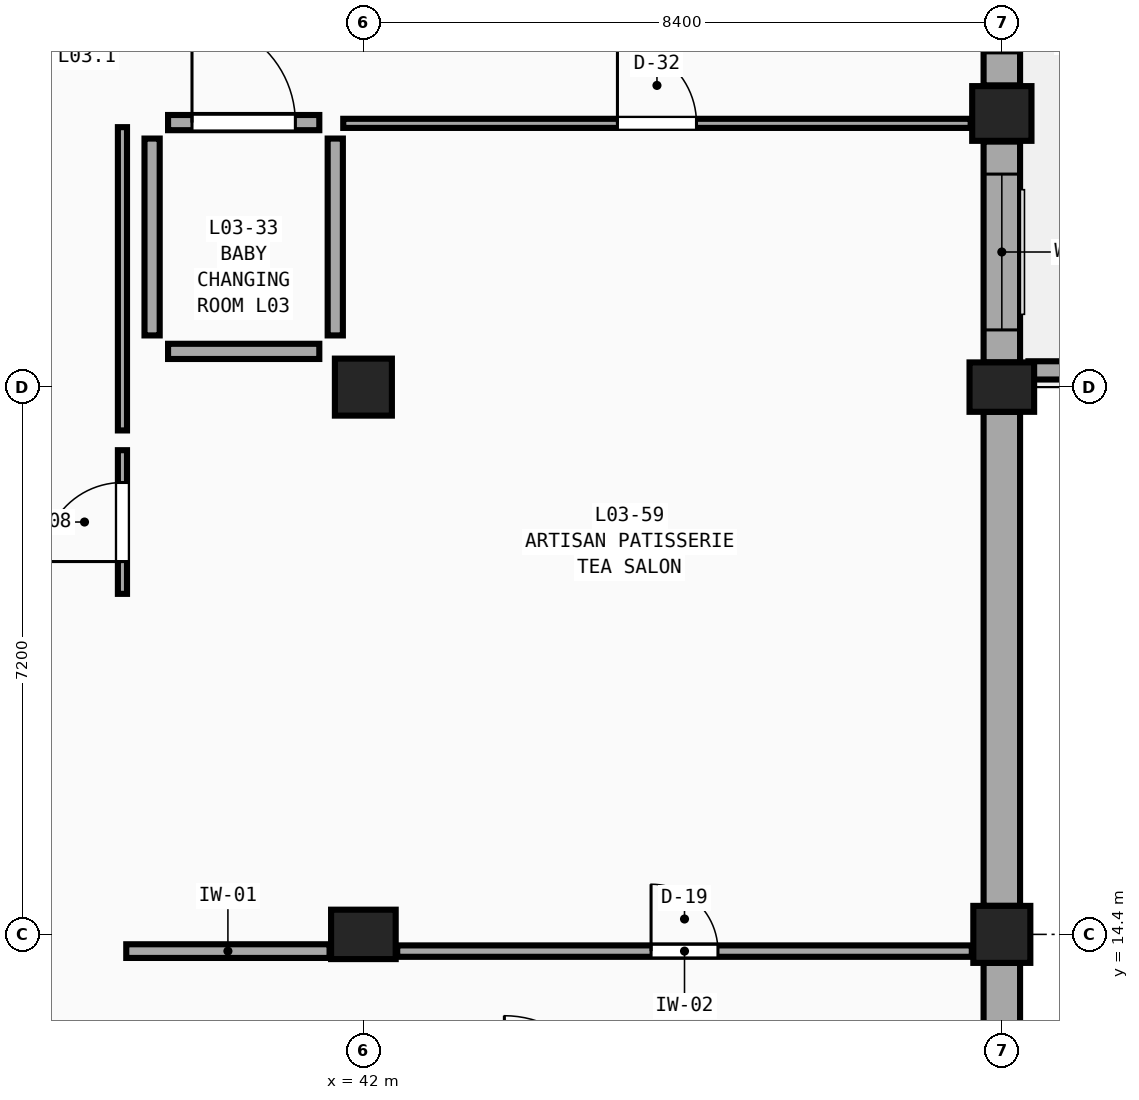
"""IFC4 building model, lengths in metres.
Left out: names, types, materials, properties, quantities, classifications, styles, units other than length and angle.
Written with IfcOpenShell. Run it as: python <this file> out.ifc"""

import sys

from ifc_helpers import new_model, si_unit, direction, frame, frame_2d, origin, origin_2d, place, context, subcontext, project, spatial, rectangle, extrude, element, fill, save


model = new_model("IFC4")
c1 = context("Model", 3, precision=1e-05, world=origin(), true_north=direction((0.0, 1.0)))
c2 = subcontext(c1, "Body", "Model", "MODEL_VIEW")
j1 = project(units=[si_unit("LENGTHUNIT", "METRE"), si_unit("PLANEANGLEUNIT", "RADIAN")], contexts=[c1])
p1 = place(None, origin())
s1 = spatial("IfcSite", under=j1, at=p1, CompositionType="ELEMENT")
p2 = place(p1, origin())
s2 = spatial("IfcBuilding", under=s1, at=p2, CompositionType="ELEMENT")
p3 = place(p2, frame((0.0, 0.0, 14.4)))
s3 = spatial("IfcBuildingStorey", under=s2, at=p3, CompositionType="ELEMENT", Elevation=14.4)
p4 = place(p3, frame((42.0, 14.4, 0.0), z_axis=(0.0, 0.0, 1.0), x_axis=(1.0, 0.0, 0.0)))
e1 = element("IfcColumn", 1, at=p4, inside=s3, PredefinedType="COLUMN", context=c2, shape_type="SweptSolid", body=[
    extrude(rectangle(XDim=0.85, YDim=0.65, at=origin_2d()), origin(), (0.0, 0.0, 1.0), 4.5),
])
for number, where, z_axis, x_axis in (
    (2, (42.0, 21.6, 0.0), (0.0, 0.0, 1.0), (1.0, 0.0, 0.0)),
    (3, (50.4, 14.4, 0.0), (0.0, 0.0, 1.0), (1.0, 0.0, 0.0)),
):
    element("IfcColumn", number, at=place(p3, frame(where, z_axis=z_axis, x_axis=x_axis)), inside=s3, PredefinedType="COLUMN", context=c2, shape_type="SweptSolid", body=[
        extrude(rectangle(XDim=0.75, YDim=0.75, at=origin_2d()), origin(), (0.0, 0.0, 1.0), 4.5),
    ])
p5 = place(p3, frame((50.4, 21.6, 0.0), z_axis=(0.0, 0.0, 1.0), x_axis=(1.0, 0.0, 0.0)))
e4 = element("IfcColumn", 4, at=p5, inside=s3, PredefinedType="COLUMN", context=c2, shape_type="SweptSolid", body=[
    extrude(rectangle(XDim=0.85, YDim=0.65, at=origin_2d()), origin(), (0.0, 0.0, 1.0), 4.5),
])
p6 = place(p3, frame((50.4, 25.2, 0.0), z_axis=(0.0, 0.0, 1.0), x_axis=(1.0, 0.0, 0.0)))
e5 = element("IfcColumn", 5, at=p6, inside=s3, PredefinedType="PILASTER", context=c2, shape_type="SweptSolid", body=[
    extrude(rectangle(XDim=0.78, YDim=0.72, at=origin_2d()), origin(), (0.0, 0.0, 1.0), 4.5),
])
p7 = place(p3, frame((50.4, 14.025, 0.0), z_axis=(0.0, 0.0, 1.0), x_axis=(0.0, -1.0, 0.0)))
e6 = element("IfcWall", 6, at=p7, inside=s3, PredefinedType="SOLIDWALL", context=c2, shape_type="SweptSolid", body=[
    extrude(rectangle(XDim=2.855, YDim=0.48, at=frame_2d((1.427, 0.0))), origin(), (0.0, 0.0, 1.0), 3.63),
])
p8 = place(p3, frame((50.4, 21.275, 0.0), z_axis=(0.0, 0.0, 1.0), x_axis=(0.0, -1.0, 0.0)))
e7 = element("IfcWall", 7, at=p8, inside=s3, PredefinedType="SOLIDWALL", context=c2, shape_type="SweptSolid", body=[
    extrude(rectangle(XDim=6.5, YDim=0.48, at=frame_2d((3.25, 0.0))), origin(), (0.0, 0.0, 1.0), 3.63),
])
p9 = place(p3, frame((50.4, 28.425, 0.0), z_axis=(0.0, 0.0, 1.0), x_axis=(0.0, -1.0, 0.0)))
e8 = element("IfcWall", 8, at=p9, inside=s3, PredefinedType="SOLIDWALL", context=c2, shape_type="SweptSolid", body=[
    extrude(rectangle(XDim=2.855, YDim=0.48, at=frame_2d((1.427, 0.0))), origin(), (0.0, 0.0, 1.0), 3.63),
])
p10 = place(p9, frame((0.427, 0.0, 0.75)))
e9 = element("IfcOpeningElement", 9, at=p10, cuts=e8, PredefinedType="OPENING", context=c2, shape_type="SweptSolid", body=[
    extrude(rectangle(XDim=2.0, YDim=2.62, at=frame_2d((1.0, 1.31))), frame((0.0, 0.26, 0.0), z_axis=(0.0, -1.0, 0.0), x_axis=(1.0, 0.0, 0.0)), (0.0, 0.0, 1.0), 0.52),
])
p11 = place(p3, frame((50.4, 24.83, 0.0), z_axis=(0.0, 0.0, 1.0), x_axis=(0.0, -1.0, 0.0)))
e10 = element("IfcWall", 10, at=p11, inside=s3, PredefinedType="SOLIDWALL", context=c2, shape_type="SweptSolid", body=[
    extrude(rectangle(XDim=2.905, YDim=0.48, at=frame_2d((1.453, 0.0))), origin(), (0.0, 0.0, 1.0), 3.63),
])
p12 = place(p11, frame((0.427, 0.0, 0.75)))
e11 = element("IfcOpeningElement", 11, at=p12, cuts=e10, PredefinedType="OPENING", context=c2, shape_type="SweptSolid", body=[
    extrude(rectangle(XDim=2.05, YDim=2.62, at=frame_2d((1.025, 1.31))), frame((0.0, 0.26, 0.0), z_axis=(0.0, -1.0, 0.0), x_axis=(1.0, 0.0, 0.0)), (0.0, 0.0, 1.0), 0.52),
])
p13 = place(p3, frame((57.95, 21.82, 0.0), z_axis=(0.0, 0.0, 1.0), x_axis=(-1.0, 0.0, 0.0)))
e12 = element("IfcWall", 12, at=p13, inside=s3, PredefinedType="PARAPET", context=c2, shape_type="SweptSolid", body=[
    extrude(rectangle(XDim=7.2, YDim=0.24, at=frame_2d((3.6, 0.0))), origin(), (0.0, 0.0, 1.0), 1.15),
])
p14 = place(p3, frame((38.88, 14.18, 0.0), z_axis=(0.0, 0.0, 1.0), x_axis=(1.0, 0.0, 0.0)))
e13 = element("IfcWall", 13, at=p14, inside=s3, PredefinedType="PARTITIONING", context=c2, shape_type="SweptSolid", body=[
    extrude(rectangle(XDim=2.675, YDim=0.18, at=frame_2d((1.337, 0.0))), origin(), (0.0, 0.0, 1.0), 3.73),
])
p15 = place(p3, frame((42.445, 14.18, 0.0), z_axis=(0.0, 0.0, 1.0), x_axis=(1.0, 0.0, 0.0)))
e14 = element("IfcWall", 14, at=p15, inside=s3, PredefinedType="PARTITIONING", context=c2, shape_type="SweptSolid", body=[
    extrude(rectangle(XDim=7.56, YDim=0.15, at=frame_2d((3.78, 0.0))), origin(), (0.0, 0.0, 1.0), 3.73),
])
p16 = place(p15, frame((3.34, 0.0, 0.0)))
e15 = element("IfcOpeningElement", 15, at=p16, cuts=e14, PredefinedType="OPENING", context=c2, shape_type="SweptSolid", body=[
    extrude(rectangle(XDim=0.88, YDim=2.29, at=frame_2d((0.44, 1.145))), frame((0.0, 0.095, 0.0), z_axis=(0.0, -1.0, 0.0), x_axis=(1.0, 0.0, 0.0)), (0.0, 0.0, 1.0), 0.19),
])
p17 = place(p3, frame((41.735, 25.07, 0.0), z_axis=(0.0, 0.0, 1.0), x_axis=(1.0, 0.0, 0.0)))
e16 = element("IfcWall", 16, at=p17, inside=s3, PredefinedType="PARTITIONING", context=c2, shape_type="SweptSolid", body=[
    extrude(rectangle(XDim=8.255, YDim=0.12, at=frame_2d((4.127, 0.0))), origin(), (0.0, 0.0, 1.0), 4.18),
])
p18 = place(p17, frame((3.607, 0.0, 0.0)))
e17 = element("IfcOpeningElement", 17, at=p18, cuts=e16, PredefinedType="OPENING", context=c2, shape_type="SweptSolid", body=[
    extrude(rectangle(XDim=1.04, YDim=2.45, at=frame_2d((0.52, 1.225))), frame((0.0, 0.08, 0.0), z_axis=(0.0, -1.0, 0.0), x_axis=(1.0, 0.0, 0.0)), (0.0, 0.0, 1.0), 0.16),
])
p19 = place(p3, frame((38.83, 21.03, 0.0), z_axis=(0.0, 0.0, 1.0), x_axis=(0.0, 1.0, 0.0)))
e18 = element("IfcWall", 18, at=p19, inside=s3, PredefinedType="PARTITIONING", context=c2, shape_type="SweptSolid", body=[
    extrude(rectangle(XDim=3.99, YDim=0.12, at=frame_2d((1.995, 0.0))), origin(), (0.0, 0.0, 1.0), 4.18),
])
p20 = place(p3, frame((39.43, 25.08, 0.0), z_axis=(0.0, 0.0, 1.0), x_axis=(1.0, 0.0, 0.0)))
e19 = element("IfcWall", 19, at=p20, inside=s3, PredefinedType="PLUMBINGWALL", context=c2, shape_type="SweptSolid", body=[
    extrude(rectangle(XDim=1.99, YDim=0.2, at=frame_2d((0.995, 0.0))), origin(), (0.0, 0.0, 1.0), 4.18),
])
p21 = place(p20, frame((0.315, 0.0, 0.0)))
e20 = element("IfcOpeningElement", 20, at=p21, cuts=e19, PredefinedType="OPENING", context=c2, shape_type="SweptSolid", body=[
    extrude(rectangle(XDim=1.36, YDim=2.05, at=frame_2d((0.68, 1.025))), frame((0.0, 0.12, 0.0), z_axis=(0.0, -1.0, 0.0), x_axis=(1.0, 0.0, 0.0)), (0.0, 0.0, 1.0), 0.24),
])
p22 = place(p3, frame((38.83, 18.88, 0.0), z_axis=(0.0, 0.0, 1.0), x_axis=(0.0, 1.0, 0.0)))
e21 = element("IfcWall", 21, at=p22, inside=s3, PredefinedType="PARTITIONING", context=c2, shape_type="SweptSolid", body=[
    extrude(rectangle(XDim=1.89, YDim=0.12, at=frame_2d((0.945, 0.0))), origin(), (0.0, 0.0, 1.0), 4.18),
])
p23 = place(p22, frame((0.425, 0.0, 0.0)))
e22 = element("IfcOpeningElement", 22, at=p23, cuts=e21, PredefinedType="OPENING", context=c2, shape_type="SweptSolid", body=[
    extrude(rectangle(XDim=1.04, YDim=2.13, at=frame_2d((0.52, 1.065))), frame((0.0, 0.08, 0.0), z_axis=(0.0, -1.0, 0.0), x_axis=(1.0, 0.0, 0.0)), (0.0, 0.0, 1.0), 0.16),
])
p24 = place(p3, frame((41.63, 22.28, 0.0), z_axis=(0.0, 0.0, 1.0), x_axis=(0.0, 1.0, 0.0)))
e23 = element("IfcWall", 23, at=p24, inside=s3, PredefinedType="PLUMBINGWALL", context=c2, shape_type="SweptSolid", body=[
    extrude(rectangle(XDim=2.59, YDim=0.2, at=frame_2d((1.295, 0.0))), origin(), (0.0, 0.0, 1.0), 3.73),
])
p25 = place(p3, frame((39.22, 22.28, 0.0), z_axis=(0.0, 0.0, 1.0), x_axis=(0.0, 1.0, 0.0)))
e24 = element("IfcWall", 24, at=p25, inside=s3, PredefinedType="PLUMBINGWALL", context=c2, shape_type="SweptSolid", body=[
    extrude(rectangle(XDim=2.59, YDim=0.2, at=frame_2d((1.295, 0.0))), origin(), (0.0, 0.0, 1.0), 4.18),
])
p26 = place(p3, frame((39.43, 22.07, 0.0), z_axis=(0.0, 0.0, 1.0), x_axis=(1.0, 0.0, 0.0)))
e25 = element("IfcWall", 25, at=p26, inside=s3, PredefinedType="PLUMBINGWALL", context=c2, shape_type="SweptSolid", body=[
    extrude(rectangle(XDim=1.99, YDim=0.2, at=frame_2d((0.995, 0.0))), origin(), (0.0, 0.0, 1.0), 3.73),
])
p27 = place(p10, origin())
e26 = element("IfcWindow", 26, at=p27, inside=s3, PartitioningType="TRIPLE_PANEL_VERTICAL", PredefinedType="WINDOW", context=c2, shape_type="SweptSolid", body=[
    extrude(rectangle(XDim=2.0, YDim=2.62, at=frame_2d((1.0, 1.31))), frame((0.0, 0.03, 0.0), z_axis=(0.0, -1.0, 0.0), x_axis=(1.0, 0.0, 0.0)), (0.0, 0.0, 1.0), 0.06),
])
fill(e9, e26)
p28 = place(p12, origin())
e27 = element("IfcWindow", 27, at=p28, inside=s3, PartitioningType="TRIPLE_PANEL_VERTICAL", PredefinedType="WINDOW", context=c2, shape_type="SweptSolid", body=[
    extrude(rectangle(XDim=2.05, YDim=2.62, at=frame_2d((1.025, 1.31))), frame((0.0, 0.03, 0.0), z_axis=(0.0, -1.0, 0.0), x_axis=(1.0, 0.0, 0.0)), (0.0, 0.0, 1.0), 0.06),
])
fill(e11, e27)
p29 = place(p16, origin())
e28 = element("IfcDoor", 28, at=p29, inside=s3, OperationType="SINGLE_SWING_LEFT", PredefinedType="DOOR", context=c2, shape_type="SweptSolid", body=[
    extrude(rectangle(XDim=0.88, YDim=2.29, at=frame_2d((0.44, 1.145))), frame((0.0, 0.025, 0.0), z_axis=(0.0, -1.0, 0.0), x_axis=(1.0, 0.0, 0.0)), (0.0, 0.0, 1.0), 0.05),
])
fill(e15, e28)
p30 = place(p18, origin())
e29 = element("IfcDoor", 29, at=p30, inside=s3, OperationType="SINGLE_SWING_LEFT", PredefinedType="DOOR", context=c2, shape_type="SweptSolid", body=[
    extrude(rectangle(XDim=1.04, YDim=2.45, at=frame_2d((0.52, 1.225))), frame((0.0, 0.025, 0.0), z_axis=(0.0, -1.0, 0.0), x_axis=(1.0, 0.0, 0.0)), (0.0, 0.0, 1.0), 0.05),
])
fill(e17, e29)
p31 = place(p21, origin())
e30 = element("IfcDoor", 30, at=p31, inside=s3, OperationType="SINGLE_SWING_LEFT", PredefinedType="DOOR", context=c2, shape_type="SweptSolid", body=[
    extrude(rectangle(XDim=1.36, YDim=2.05, at=frame_2d((0.68, 1.025))), frame((0.0, 0.025, 0.0), z_axis=(0.0, -1.0, 0.0), x_axis=(1.0, 0.0, 0.0)), (0.0, 0.0, 1.0), 0.05),
])
fill(e20, e30)
p32 = place(p23, origin())
e31 = element("IfcDoor", 31, at=p32, inside=s3, OperationType="SINGLE_SWING_LEFT", PredefinedType="DOOR", context=c2, shape_type="SweptSolid", body=[
    extrude(rectangle(XDim=1.04, YDim=2.13, at=frame_2d((0.52, 1.065))), frame((0.0, 0.025, 0.0), z_axis=(0.0, -1.0, 0.0), x_axis=(1.0, 0.0, 0.0)), (0.0, 0.0, 1.0), 0.05),
])
fill(e22, e31)
save(model, sys.argv[1])
